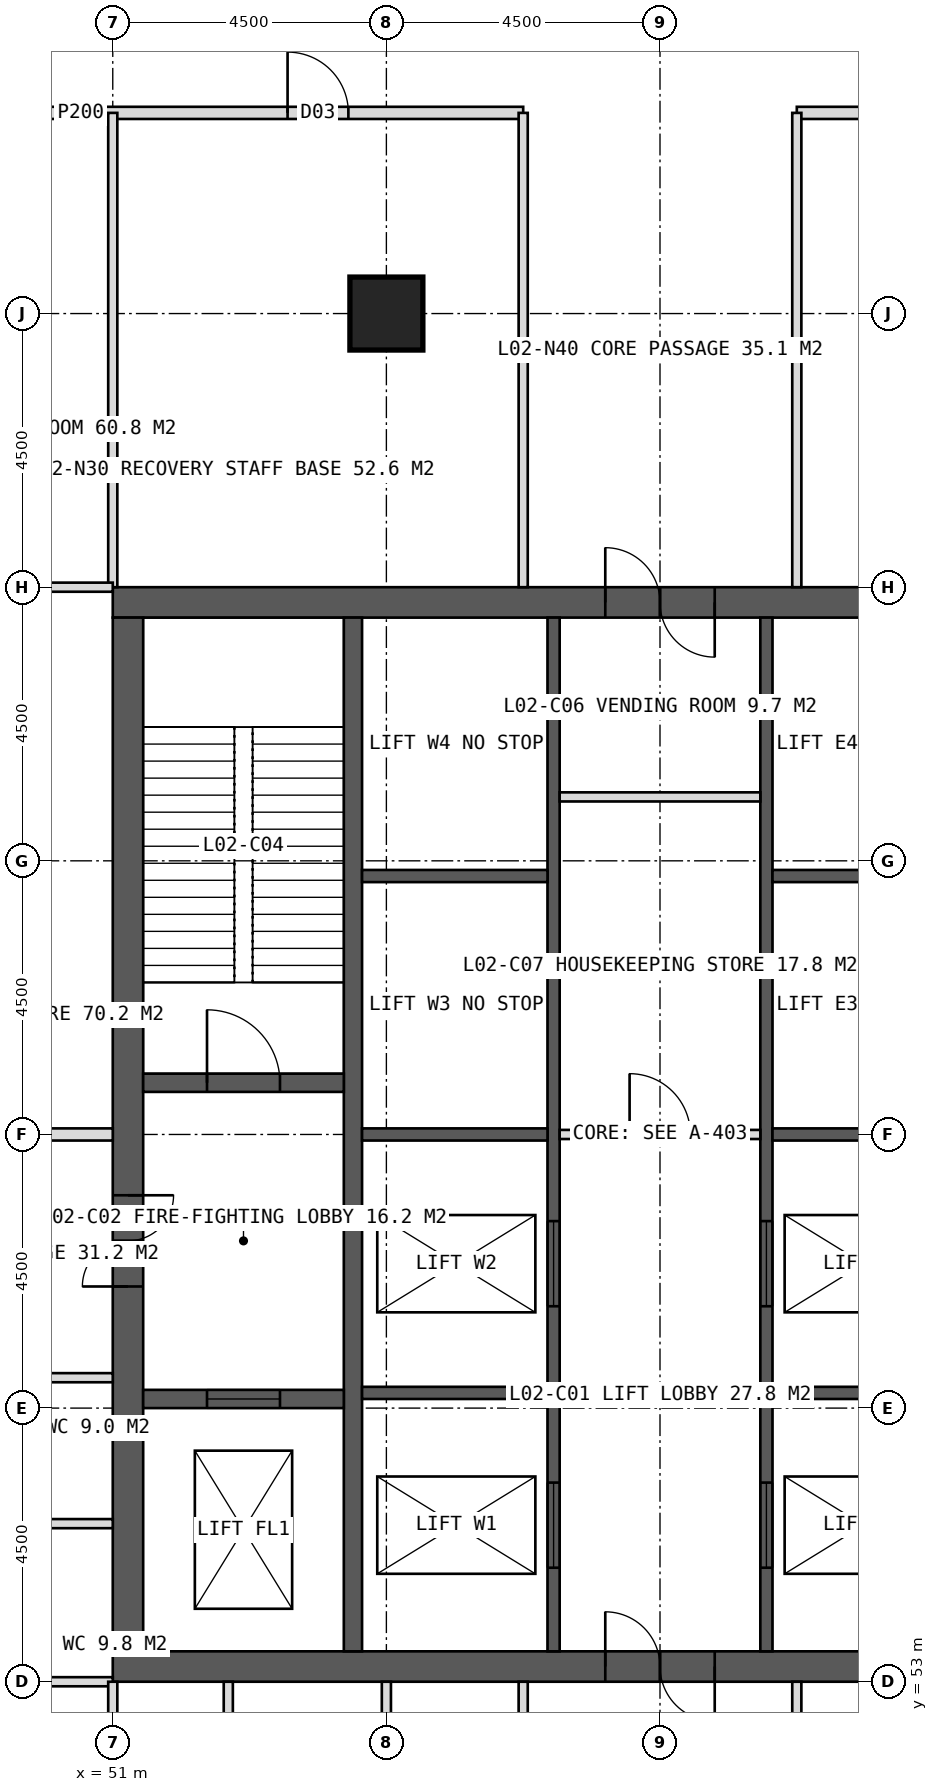
"""IFC4 building model, lengths in metres.
Left out: names, types, materials, properties, quantities, classifications, styles, units other than length and angle.
Written with IfcOpenShell. Run it as: python <this file> out.ifc"""

import sys

from ifc_helpers import new_model, si_unit, direction, frame, frame_2d, origin, origin_2d, place, context, subcontext, project, spatial, rectangle, hollow_rectangle, extrude, element, fill, save


model = new_model("IFC4")
c1 = context("Model", 3, precision=1e-05, world=origin(), true_north=direction((0.0, 1.0)))
c2 = subcontext(c1, "Body", "Model", "MODEL_VIEW")
j1 = project(units=[si_unit("LENGTHUNIT", "METRE"), si_unit("PLANEANGLEUNIT", "RADIAN")], contexts=[c1])
p1 = place(None, origin())
s1 = spatial("IfcSite", under=j1, at=p1, CompositionType="ELEMENT")
p2 = place(p1, origin())
s2 = spatial("IfcBuilding", under=s1, at=p2, CompositionType="ELEMENT")
p3 = place(p2, frame((0.0, 0.0, 11.0)))
s3 = spatial("IfcBuildingStorey", under=s2, at=p3, CompositionType="ELEMENT", Elevation=11.0)
p4 = place(p3, frame((51.0, 70.75, 0.0), z_axis=(0.0, 0.0, 1.0), x_axis=(1.0, 0.0, 0.0)))
e1 = element("IfcWall", 1, at=p4, inside=s3, PredefinedType="SHEAR", context=c2, shape_type="SweptSolid", body=[
    extrude(rectangle(XDim=18.0, YDim=0.5, at=frame_2d((9.0, 0.0))), origin(), (0.0, 0.0, 1.0), 5.5),
])
p5 = place(p4, frame((8.1, 0.0, 0.0)))
e2 = element("IfcOpeningElement", 2, at=p5, cuts=e1, PredefinedType="OPENING", context=c2, shape_type="SweptSolid", body=[
    extrude(rectangle(XDim=1.8, YDim=2.2, at=frame_2d((0.9, 1.1))), frame((0.0, 0.26, 0.0), z_axis=(0.0, -1.0, 0.0), x_axis=(1.0, 0.0, 0.0)), (0.0, 0.0, 1.0), 0.52),
])
p6 = place(p3, frame((51.0, 53.25, 0.0), z_axis=(0.0, 0.0, 1.0), x_axis=(1.0, 0.0, 0.0)))
e3 = element("IfcWall", 3, at=p6, inside=s3, PredefinedType="SHEAR", context=c2, shape_type="SweptSolid", body=[
    extrude(rectangle(XDim=18.0, YDim=0.5, at=frame_2d((9.0, 0.0))), origin(), (0.0, 0.0, 1.0), 5.5),
])
p7 = place(p6, frame((8.1, 0.0, 0.0)))
e4 = element("IfcOpeningElement", 4, at=p7, cuts=e3, PredefinedType="OPENING", context=c2, shape_type="SweptSolid", body=[
    extrude(rectangle(XDim=1.8, YDim=2.2, at=frame_2d((0.9, 1.1))), frame((0.0, 0.26, 0.0), z_axis=(0.0, -1.0, 0.0), x_axis=(1.0, 0.0, 0.0)), (0.0, 0.0, 1.0), 0.52),
])
p8 = place(p3, frame((51.25, 53.5, 0.0), z_axis=(0.0, 0.0, 1.0), x_axis=(0.0, 1.0, 0.0)))
e5 = element("IfcWall", 5, at=p8, inside=s3, PredefinedType="SHEAR", context=c2, shape_type="SweptSolid", body=[
    extrude(rectangle(XDim=17.0, YDim=0.5, at=frame_2d((8.5, 0.0))), origin(), (0.0, 0.0, 1.0), 5.5),
])
p9 = place(p8, frame((6.0, 0.0, 0.0)))
e6 = element("IfcOpeningElement", 6, at=p9, cuts=e5, PredefinedType="OPENING", context=c2, shape_type="SweptSolid", body=[
    extrude(rectangle(XDim=1.5, YDim=2.2, at=frame_2d((0.75, 1.1))), frame((0.0, 0.26, 0.0), z_axis=(0.0, -1.0, 0.0), x_axis=(1.0, 0.0, 0.0)), (0.0, 0.0, 1.0), 0.52),
])
p10 = place(p3, frame((54.95, 53.5, 0.0), z_axis=(0.0, 0.0, 1.0), x_axis=(0.0, 1.0, 0.0)))
e7 = element("IfcWall", 7, at=p10, inside=s3, PredefinedType="SHEAR", context=c2, shape_type="SweptSolid", body=[
    extrude(rectangle(XDim=17.0, YDim=0.3, at=frame_2d((8.5, 0.0))), origin(), (0.0, 0.0, 1.0), 5.5),
])
p11 = place(p3, frame((58.25, 53.5, 0.0), z_axis=(0.0, 0.0, 1.0), x_axis=(0.0, 1.0, 0.0)))
e8 = element("IfcWall", 8, at=p11, inside=s3, PredefinedType="SHEAR", context=c2, shape_type="SweptSolid", body=[
    extrude(rectangle(XDim=17.0, YDim=0.2, at=frame_2d((8.5, 0.0))), origin(), (0.0, 0.0, 1.0), 5.5),
])
p12 = place(p11, frame((1.375, 0.0, 0.0)))
e9 = element("IfcOpeningElement", 9, at=p12, cuts=e8, PredefinedType="OPENING", context=c2, shape_type="SweptSolid", body=[
    extrude(rectangle(XDim=1.4, YDim=2.2, at=frame_2d((0.7, 1.1))), frame((0.0, 0.11, 0.0), z_axis=(0.0, -1.0, 0.0), x_axis=(1.0, 0.0, 0.0)), (0.0, 0.0, 1.0), 0.22),
])
p13 = place(p11, frame((5.675, 0.0, 0.0)))
e10 = element("IfcOpeningElement", 10, at=p13, cuts=e8, PredefinedType="OPENING", context=c2, shape_type="SweptSolid", body=[
    extrude(rectangle(XDim=1.4, YDim=2.2, at=frame_2d((0.7, 1.1))), frame((0.0, 0.11, 0.0), z_axis=(0.0, -1.0, 0.0), x_axis=(1.0, 0.0, 0.0)), (0.0, 0.0, 1.0), 0.22),
])
p14 = place(p3, frame((61.75, 53.5, 0.0), z_axis=(0.0, 0.0, 1.0), x_axis=(0.0, 1.0, 0.0)))
e11 = element("IfcWall", 11, at=p14, inside=s3, PredefinedType="SHEAR", context=c2, shape_type="SweptSolid", body=[
    extrude(rectangle(XDim=17.0, YDim=0.2, at=frame_2d((8.5, 0.0))), origin(), (0.0, 0.0, 1.0), 5.5),
])
p15 = place(p14, frame((1.375, 0.0, 0.0)))
e12 = element("IfcOpeningElement", 12, at=p15, cuts=e11, PredefinedType="OPENING", context=c2, shape_type="SweptSolid", body=[
    extrude(rectangle(XDim=1.4, YDim=2.2, at=frame_2d((0.7, 1.1))), frame((0.0, 0.11, 0.0), z_axis=(0.0, -1.0, 0.0), x_axis=(1.0, 0.0, 0.0)), (0.0, 0.0, 1.0), 0.22),
])
p16 = place(p14, frame((5.675, 0.0, 0.0)))
e13 = element("IfcOpeningElement", 13, at=p16, cuts=e11, PredefinedType="OPENING", context=c2, shape_type="SweptSolid", body=[
    extrude(rectangle(XDim=1.4, YDim=2.2, at=frame_2d((0.7, 1.1))), frame((0.0, 0.11, 0.0), z_axis=(0.0, -1.0, 0.0), x_axis=(1.0, 0.0, 0.0)), (0.0, 0.0, 1.0), 0.22),
])
for number, where, z_axis, x_axis in (
    (14, (55.1, 57.75, 0.0), (0.0, 0.0, 1.0), (1.0, 0.0, 0.0)),
    (15, (61.85, 57.75, 0.0), (0.0, 0.0, 1.0), (1.0, 0.0, 0.0)),
    (16, (55.1, 62.0, 0.0), (0.0, 0.0, 1.0), (1.0, 0.0, 0.0)),
    (17, (61.85, 62.0, 0.0), (0.0, 0.0, 1.0), (1.0, 0.0, 0.0)),
    (18, (55.1, 66.25, 0.0), (0.0, 0.0, 1.0), (1.0, 0.0, 0.0)),
    (19, (61.85, 66.25, 0.0), (0.0, 0.0, 1.0), (1.0, 0.0, 0.0)),
):
    element("IfcWall", number, at=place(p3, frame(where, z_axis=z_axis, x_axis=x_axis)), inside=s3, PredefinedType="SHEAR", context=c2, shape_type="SweptSolid", body=[
        extrude(rectangle(XDim=3.05, YDim=0.2, at=frame_2d((1.525, 0.0))), origin(), (0.0, 0.0, 1.0), 5.5),
    ])
p17 = place(p3, frame((51.5, 62.85, 0.0), z_axis=(0.0, 0.0, 1.0), x_axis=(1.0, 0.0, 0.0)))
e20 = element("IfcWall", 20, at=p17, inside=s3, PredefinedType="SHEAR", context=c2, shape_type="SweptSolid", body=[
    extrude(rectangle(XDim=3.3, YDim=0.3, at=frame_2d((1.65, 0.0))), origin(), (0.0, 0.0, 1.0), 5.5),
])
p18 = place(p17, frame((1.05, 0.0, 0.0)))
e21 = element("IfcOpeningElement", 21, at=p18, cuts=e20, PredefinedType="OPENING", context=c2, shape_type="SweptSolid", body=[
    extrude(rectangle(XDim=1.2, YDim=2.1, at=frame_2d((0.6, 1.05))), frame((0.0, 0.16, 0.0), z_axis=(0.0, -1.0, 0.0), x_axis=(1.0, 0.0, 0.0)), (0.0, 0.0, 1.0), 0.32),
])
p19 = place(p3, frame((51.5, 57.65, 0.0), z_axis=(0.0, 0.0, 1.0), x_axis=(1.0, 0.0, 0.0)))
e22 = element("IfcWall", 22, at=p19, inside=s3, PredefinedType="SHEAR", context=c2, shape_type="SweptSolid", body=[
    extrude(rectangle(XDim=3.3, YDim=0.3, at=frame_2d((1.65, 0.0))), origin(), (0.0, 0.0, 1.0), 5.5),
])
p20 = place(p19, frame((1.05, 0.0, 0.0)))
e23 = element("IfcOpeningElement", 23, at=p20, cuts=e22, PredefinedType="OPENING", context=c2, shape_type="SweptSolid", body=[
    extrude(rectangle(XDim=1.2, YDim=2.2, at=frame_2d((0.6, 1.1))), frame((0.0, 0.16, 0.0), z_axis=(0.0, -1.0, 0.0), x_axis=(1.0, 0.0, 0.0)), (0.0, 0.0, 1.0), 0.32),
])
p21 = place(p3, frame((55.5, 75.5, 0.0), z_axis=(0.0, 0.0, 1.0), x_axis=(1.0, 0.0, 0.0)))
e24 = element("IfcColumn", 24, at=p21, inside=s3, PredefinedType="COLUMN", context=c2, shape_type="SweptSolid", body=[
    extrude(hollow_rectangle(XDim=1.2, YDim=1.2, WallThickness=0.1, at=origin_2d()), origin(), (0.0, 0.0, 1.0), 5.5),
])
p22 = place(p3, frame((43.2, 78.8, 0.0), z_axis=(0.0, 0.0, 1.0), x_axis=(1.0, 0.0, 0.0)))
e25 = element("IfcWall", 25, at=p22, inside=s3, PredefinedType="PARTITIONING", context=c2, shape_type="SweptSolid", body=[
    extrude(rectangle(XDim=14.55, YDim=0.2, at=frame_2d((7.275, 0.0))), origin(), (0.0, 0.0, 1.0), 5.2),
])
p23 = place(p22, frame((10.675, 0.0, 0.0)))
e26 = element("IfcOpeningElement", 26, at=p23, cuts=e25, PredefinedType="OPENING", context=c2, shape_type="SweptSolid", body=[
    extrude(rectangle(XDim=1.0, YDim=2.1, at=frame_2d((0.5, 1.05))), frame((0.0, 0.11, 0.0), z_axis=(0.0, -1.0, 0.0), x_axis=(1.0, 0.0, 0.0)), (0.0, 0.0, 1.0), 0.22),
])
p24 = place(p3, frame((62.25, 78.8, 0.0), z_axis=(0.0, 0.0, 1.0), x_axis=(1.0, 0.0, 0.0)))
e27 = element("IfcWall", 27, at=p24, inside=s3, PredefinedType="PARTITIONING", context=c2, shape_type="SweptSolid", body=[
    extrude(rectangle(XDim=6.75, YDim=0.2, at=frame_2d((3.375, 0.0))), origin(), (0.0, 0.0, 1.0), 5.2),
])
p25 = place(p24, frame((2.875, 0.0, 0.0)))
e28 = element("IfcOpeningElement", 28, at=p25, cuts=e27, PredefinedType="OPENING", context=c2, shape_type="SweptSolid", body=[
    extrude(rectangle(XDim=1.0, YDim=2.1, at=frame_2d((0.5, 1.05))), frame((0.0, 0.11, 0.0), z_axis=(0.0, -1.0, 0.0), x_axis=(1.0, 0.0, 0.0)), (0.0, 0.0, 1.0), 0.22),
])
for number, where, z_axis, x_axis in (
    (29, (51.0, 71.0, 0.0), (0.0, 0.0, 1.0), (0.0, 1.0, 0.0)),
    (30, (57.75, 71.0, 0.0), (0.0, 0.0, 1.0), (0.0, 1.0, 0.0)),
    (31, (62.25, 71.0, 0.0), (0.0, 0.0, 1.0), (0.0, 1.0, 0.0)),
    (32, (51.0, 53.0, 0.0), (0.0, 0.0, 1.0), (-1.0, 0.0, 0.0)),
):
    element("IfcWall", number, at=place(p3, frame(where, z_axis=z_axis, x_axis=x_axis)), inside=s3, PredefinedType="PARTITIONING", context=c2, shape_type="SweptSolid", body=[
        extrude(rectangle(XDim=7.8, YDim=0.15, at=frame_2d((3.9, 0.0))), origin(), (0.0, 0.0, 1.0), 5.2),
    ])
p26 = place(p3, frame((51.0, 58.0, 0.0), z_axis=(0.0, 0.0, 1.0), x_axis=(-1.0, 0.0, 0.0)))
e33 = element("IfcWall", 33, at=p26, inside=s3, PredefinedType="PARTITIONING", context=c2, shape_type="SweptSolid", body=[
    extrude(rectangle(XDim=3.9, YDim=0.15, at=frame_2d((1.95, 0.0))), origin(), (0.0, 0.0, 1.0), 5.2),
])
p27 = place(p3, frame((51.0, 62.0, 0.0), z_axis=(0.0, 0.0, 1.0), x_axis=(-1.0, 0.0, 0.0)))
e34 = element("IfcWall", 34, at=p27, inside=s3, PredefinedType="SOLIDWALL", context=c2, shape_type="SweptSolid", body=[
    extrude(rectangle(XDim=7.8, YDim=0.2, at=frame_2d((3.9, 0.0))), origin(), (0.0, 0.0, 1.0), 4.4),
])
p28 = place(p3, frame((51.0, 71.0, 0.0), z_axis=(0.0, 0.0, 1.0), x_axis=(-1.0, 0.0, 0.0)))
e35 = element("IfcWall", 35, at=p28, inside=s3, PredefinedType="PARTITIONING", context=c2, shape_type="SweptSolid", body=[
    extrude(rectangle(XDim=7.8, YDim=0.15, at=frame_2d((3.9, 0.0))), origin(), (0.0, 0.0, 1.0), 5.2),
])
p29 = place(p3, frame((51.0, 55.6, 0.0), z_axis=(0.0, 0.0, 1.0), x_axis=(-1.0, 0.0, 0.0)))
e36 = element("IfcWall", 36, at=p29, inside=s3, PredefinedType="PARTITIONING", context=c2, shape_type="SweptSolid", body=[
    extrude(rectangle(XDim=3.75, YDim=0.15, at=frame_2d((1.875, 0.0))), origin(), (0.0, 0.0, 1.0), 5.2),
])
for number, where, z_axis, x_axis in (
    (37, (62.25, 53.0, 0.0), (0.0, 0.0, 1.0), (0.0, -1.0, 0.0)),
    (38, (57.75, 53.0, 0.0), (0.0, 0.0, 1.0), (0.0, -1.0, 0.0)),
    (39, (51.0, 53.0, 0.0), (0.0, 0.0, 1.0), (0.0, -1.0, 0.0)),
):
    element("IfcWall", number, at=place(p3, frame(where, z_axis=z_axis, x_axis=x_axis)), inside=s3, PredefinedType="PARTITIONING", context=c2, shape_type="SweptSolid", body=[
        extrude(rectangle(XDim=7.8, YDim=0.15, at=frame_2d((3.9, 0.0))), origin(), (0.0, 0.0, 1.0), 5.2),
    ])
p30 = place(p3, frame((55.5, 53.0, 0.0), z_axis=(0.0, 0.0, 1.0), x_axis=(0.0, -1.0, 0.0)))
e40 = element("IfcWall", 40, at=p30, inside=s3, PredefinedType="PARTITIONING", context=c2, shape_type="SweptSolid", body=[
    extrude(rectangle(XDim=3.75, YDim=0.15, at=frame_2d((1.875, 0.0))), origin(), (0.0, 0.0, 1.0), 4.3),
])
p31 = place(p3, frame((52.9, 53.0, 0.0), z_axis=(0.0, 0.0, 1.0), x_axis=(0.0, -1.0, 0.0)))
e41 = element("IfcWall", 41, at=p31, inside=s3, PredefinedType="PARTITIONING", context=c2, shape_type="SweptSolid", body=[
    extrude(rectangle(XDim=3.75, YDim=0.15, at=frame_2d((1.875, 0.0))), origin(), (0.0, 0.0, 1.0), 5.2),
])
p32 = place(p3, frame((58.35, 62.0, 0.0), z_axis=(0.0, 0.0, 1.0), x_axis=(1.0, 0.0, 0.0)))
e42 = element("IfcWall", 42, at=p32, inside=s3, PredefinedType="PARTITIONING", context=c2, shape_type="SweptSolid", body=[
    extrude(rectangle(XDim=3.3, YDim=0.15, at=frame_2d((1.65, 0.0))), origin(), (0.0, 0.0, 1.0), 5.2),
])
p33 = place(p32, frame((1.15, 0.0, 0.0)))
e43 = element("IfcOpeningElement", 43, at=p33, cuts=e42, PredefinedType="OPENING", context=c2, shape_type="SweptSolid", body=[
    extrude(rectangle(XDim=1.0, YDim=2.1, at=frame_2d((0.5, 1.05))), frame((0.0, 0.085, 0.0), z_axis=(0.0, -1.0, 0.0), x_axis=(1.0, 0.0, 0.0)), (0.0, 0.0, 1.0), 0.17),
])
p34 = place(p3, frame((58.35, 67.551, 0.0), z_axis=(0.0, 0.0, 1.0), x_axis=(1.0, 0.0, 0.0)))
e44 = element("IfcWall", 44, at=p34, inside=s3, PredefinedType="PARTITIONING", context=c2, shape_type="SweptSolid", body=[
    extrude(rectangle(XDim=3.3, YDim=0.15, at=frame_2d((1.65, 0.0))), origin(), (0.0, 0.0, 1.0), 5.2),
])
p35 = place(p23, origin())
e45 = element("IfcDoor", 45, at=p35, inside=s3, OperationType="SINGLE_SWING_LEFT", PredefinedType="DOOR", context=c2, shape_type="SweptSolid", body=[
    extrude(rectangle(XDim=1.0, YDim=2.1, at=frame_2d((0.5, 1.05))), frame((0.0, 0.025, 0.0), z_axis=(0.0, -1.0, 0.0), x_axis=(1.0, 0.0, 0.0)), (0.0, 0.0, 1.0), 0.05),
])
fill(e26, e45)
p36 = place(p7, origin())
e46 = element("IfcDoor", 46, at=p36, inside=s3, OperationType="DOUBLE_DOOR_SINGLE_SWING", PredefinedType="DOOR", context=c2, shape_type="SweptSolid", body=[
    extrude(rectangle(XDim=1.8, YDim=2.2, at=frame_2d((0.9, 1.1))), frame((0.0, 0.025, 0.0), z_axis=(0.0, -1.0, 0.0), x_axis=(1.0, 0.0, 0.0)), (0.0, 0.0, 1.0), 0.05),
])
fill(e4, e46)
p37 = place(p9, origin())
e47 = element("IfcDoor", 47, at=p37, inside=s3, OperationType="DOUBLE_DOOR_SINGLE_SWING", PredefinedType="DOOR", context=c2, shape_type="SweptSolid", body=[
    extrude(rectangle(XDim=1.5, YDim=2.2, at=frame_2d((0.75, 1.1))), frame((0.0, 0.025, 0.0), z_axis=(0.0, -1.0, 0.0), x_axis=(1.0, 0.0, 0.0)), (0.0, 0.0, 1.0), 0.05),
])
fill(e6, e47)
p38 = place(p18, origin())
e48 = element("IfcDoor", 48, at=p38, inside=s3, OperationType="SINGLE_SWING_LEFT", PredefinedType="DOOR", context=c2, shape_type="SweptSolid", body=[
    extrude(rectangle(XDim=1.2, YDim=2.1, at=frame_2d((0.6, 1.05))), frame((0.0, 0.025, 0.0), z_axis=(0.0, -1.0, 0.0), x_axis=(1.0, 0.0, 0.0)), (0.0, 0.0, 1.0), 0.05),
])
fill(e21, e48)
p39 = place(p20, origin())
e49 = element("IfcDoor", 49, at=p39, inside=s3, OperationType="SLIDING_TO_LEFT", PredefinedType="DOOR", context=c2, shape_type="SweptSolid", body=[
    extrude(rectangle(XDim=1.2, YDim=2.2, at=frame_2d((0.6, 1.1))), frame((0.0, 0.025, 0.0), z_axis=(0.0, -1.0, 0.0), x_axis=(1.0, 0.0, 0.0)), (0.0, 0.0, 1.0), 0.05),
])
fill(e23, e49)
p40 = place(p12, origin())
e50 = element("IfcDoor", 50, at=p40, inside=s3, OperationType="SLIDING_TO_LEFT", PredefinedType="DOOR", context=c2, shape_type="SweptSolid", body=[
    extrude(rectangle(XDim=1.4, YDim=2.2, at=frame_2d((0.7, 1.1))), frame((0.0, 0.025, 0.0), z_axis=(0.0, -1.0, 0.0), x_axis=(1.0, 0.0, 0.0)), (0.0, 0.0, 1.0), 0.05),
])
fill(e9, e50)
p41 = place(p15, origin())
e51 = element("IfcDoor", 51, at=p41, inside=s3, OperationType="SLIDING_TO_LEFT", PredefinedType="DOOR", context=c2, shape_type="SweptSolid", body=[
    extrude(rectangle(XDim=1.4, YDim=2.2, at=frame_2d((0.7, 1.1))), frame((0.0, 0.025, 0.0), z_axis=(0.0, -1.0, 0.0), x_axis=(1.0, 0.0, 0.0)), (0.0, 0.0, 1.0), 0.05),
])
fill(e12, e51)
p42 = place(p13, origin())
e52 = element("IfcDoor", 52, at=p42, inside=s3, OperationType="SLIDING_TO_LEFT", PredefinedType="DOOR", context=c2, shape_type="SweptSolid", body=[
    extrude(rectangle(XDim=1.4, YDim=2.2, at=frame_2d((0.7, 1.1))), frame((0.0, 0.025, 0.0), z_axis=(0.0, -1.0, 0.0), x_axis=(1.0, 0.0, 0.0)), (0.0, 0.0, 1.0), 0.05),
])
fill(e10, e52)
p43 = place(p16, origin())
e53 = element("IfcDoor", 53, at=p43, inside=s3, OperationType="SLIDING_TO_LEFT", PredefinedType="DOOR", context=c2, shape_type="SweptSolid", body=[
    extrude(rectangle(XDim=1.4, YDim=2.2, at=frame_2d((0.7, 1.1))), frame((0.0, 0.025, 0.0), z_axis=(0.0, -1.0, 0.0), x_axis=(1.0, 0.0, 0.0)), (0.0, 0.0, 1.0), 0.05),
])
fill(e13, e53)
p44 = place(p33, origin())
e54 = element("IfcDoor", 54, at=p44, inside=s3, OperationType="SINGLE_SWING_LEFT", PredefinedType="DOOR", context=c2, shape_type="SweptSolid", body=[
    extrude(rectangle(XDim=1.0, YDim=2.1, at=frame_2d((0.5, 1.05))), frame((0.0, 0.025, 0.0), z_axis=(0.0, -1.0, 0.0), x_axis=(1.0, 0.0, 0.0)), (0.0, 0.0, 1.0), 0.05),
])
fill(e43, e54)
p45 = place(p5, origin())
e55 = element("IfcDoor", 55, at=p45, inside=s3, OperationType="DOUBLE_DOOR_SINGLE_SWING", PredefinedType="DOOR", context=c2, shape_type="SweptSolid", body=[
    extrude(rectangle(XDim=1.8, YDim=2.2, at=frame_2d((0.9, 1.1))), frame((0.0, 0.025, 0.0), z_axis=(0.0, -1.0, 0.0), x_axis=(1.0, 0.0, 0.0)), (0.0, 0.0, 1.0), 0.05),
])
fill(e2, e55)
save(model, sys.argv[1])
